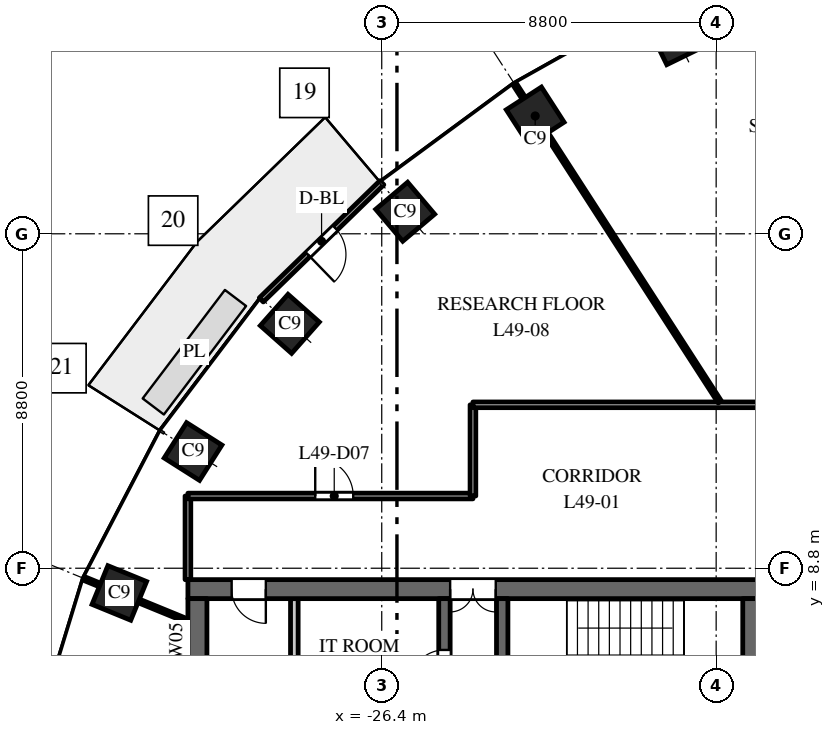
"""IFC4 building model, lengths in metres.
Left out: names, types, materials, properties, quantities, classifications, styles, units other than length and angle.
Written with IfcOpenShell. Run it as: python <this file> out.ifc"""

import sys

from ifc_helpers import new_model, si_unit, direction, frame, frame_2d, origin, origin_2d, place, context, subcontext, project, spatial, rectangle, extrude, element, fill, save


model = new_model("IFC4")
c1 = context("Model", 3, precision=1e-05, world=origin(), true_north=direction((0.0, 1.0)))
c2 = subcontext(c1, "Body", "Model", "MODEL_VIEW")
j1 = project(units=[si_unit("LENGTHUNIT", "METRE"), si_unit("PLANEANGLEUNIT", "RADIAN")], contexts=[c1])
p1 = place(None, origin())
s1 = spatial("IfcSite", under=j1, at=p1, CompositionType="ELEMENT")
p2 = place(p1, origin())
s2 = spatial("IfcBuilding", under=s1, at=p2, CompositionType="ELEMENT")
p3 = place(p2, frame((0.0, 0.0, 237.5)))
s3 = spatial("IfcBuildingStorey", under=s2, at=p3, CompositionType="ELEMENT", Elevation=237.5)
for number, where, z_axis, x_axis in (
    (1, (-18.646, 22.785, 0.0), (0.0, 0.0, 1.0), (-0.898, -0.439, 0.0)),
    (2, (-22.362, 20.7, 0.0), (0.0, 0.0, 1.0), (-0.84, -0.542, 0.0)),
    (3, (-25.783, 18.18, 0.0), (0.0, 0.0, 1.0), (-0.763, -0.646, 0.0)),
    (4, (-28.819, 15.23, 0.0), (0.0, 0.0, 1.0), (-0.663, -0.749, 0.0)),
    (5, (-31.365, 11.871, 0.0), (0.0, 0.0, 1.0), (-0.535, -0.845, 0.0)),
    (6, (-33.305, 8.149, 0.0), (0.0, 0.0, 1.0), (-0.379, -0.925, 0.0)),
):
    element("IfcColumn", number, at=place(p3, frame(where, z_axis=z_axis, x_axis=x_axis)), inside=s3, PredefinedType="COLUMN", context=c2, shape_type="SweptSolid", body=[
        extrude(rectangle(XDim=1.1, YDim=1.1, at=origin_2d()), origin(), (0.0, 0.0, 1.0), 4.0),
    ])
p4 = place(p3, frame((-16.5, 8.25, 0.0), z_axis=(0.0, 0.0, 1.0), x_axis=(-1.0, 0.0, 0.0)))
e7 = element("IfcWall", 7, at=p4, inside=s3, PredefinedType="SHEAR", context=c2, shape_type="SweptSolid", body=[
    extrude(rectangle(XDim=15.0, YDim=0.5, at=frame_2d((7.5, 0.0))), origin(), (0.0, 0.0, 1.0), 3.7),
])
p5 = place(p4, frame((6.9, 0.0, 0.0)))
e8 = element("IfcOpeningElement", 8, at=p5, cuts=e7, PredefinedType="OPENING", context=c2, shape_type="SweptSolid", body=[
    extrude(rectangle(XDim=1.2, YDim=2.1, at=frame_2d((0.6, 1.05))), frame((0.0, 0.26, 0.0), z_axis=(0.0, -1.0, 0.0), x_axis=(1.0, 0.0, 0.0)), (0.0, 0.0, 1.0), 0.52),
])
p6 = place(p4, frame((12.95, 0.0, 0.0)))
e9 = element("IfcOpeningElement", 9, at=p6, cuts=e7, PredefinedType="OPENING", context=c2, shape_type="SweptSolid", body=[
    extrude(rectangle(XDim=0.9, YDim=2.1, at=frame_2d((0.45, 1.05))), frame((0.0, 0.26, 0.0), z_axis=(0.0, -1.0, 0.0), x_axis=(1.0, 0.0, 0.0)), (0.0, 0.0, 1.0), 0.52),
])
p7 = place(p3, frame((-24.75, -8.0, 0.0), z_axis=(0.0, 0.0, 1.0), x_axis=(0.0, 1.0, 0.0)))
e10 = element("IfcWall", 10, at=p7, inside=s3, PredefinedType="SHEAR", context=c2, shape_type="SweptSolid", body=[
    extrude(rectangle(XDim=16.0, YDim=0.3, at=frame_2d((8.0, 0.0))), origin(), (0.0, 0.0, 1.0), 3.7),
])
p8 = place(p7, frame((4.425, 0.0, 0.0)))
e11 = element("IfcOpeningElement", 11, at=p8, cuts=e10, PredefinedType="OPENING", context=c2, shape_type="SweptSolid", body=[
    extrude(rectangle(XDim=1.1, YDim=2.1, at=frame_2d((0.55, 1.05))), frame((0.0, 0.16, 0.0), z_axis=(0.0, -1.0, 0.0), x_axis=(1.0, 0.0, 0.0)), (0.0, 0.0, 1.0), 0.32),
])
p9 = place(p7, frame((7.45, 0.0, 0.0)))
e12 = element("IfcOpeningElement", 12, at=p9, cuts=e10, PredefinedType="OPENING", context=c2, shape_type="SweptSolid", body=[
    extrude(rectangle(XDim=1.1, YDim=2.1, at=frame_2d((0.55, 1.05))), frame((0.0, 0.16, 0.0), z_axis=(0.0, -1.0, 0.0), x_axis=(1.0, 0.0, 0.0)), (0.0, 0.0, 1.0), 0.32),
])
p10 = place(p7, frame((10.475, 0.0, 0.0)))
e13 = element("IfcOpeningElement", 13, at=p10, cuts=e10, PredefinedType="OPENING", context=c2, shape_type="SweptSolid", body=[
    extrude(rectangle(XDim=1.1, YDim=2.1, at=frame_2d((0.55, 1.05))), frame((0.0, 0.16, 0.0), z_axis=(0.0, -1.0, 0.0), x_axis=(1.0, 0.0, 0.0)), (0.0, 0.0, 1.0), 0.32),
])
p11 = place(p7, frame((13.75, 0.0, 0.0)))
e14 = element("IfcOpeningElement", 14, at=p11, cuts=e10, PredefinedType="OPENING", context=c2, shape_type="SweptSolid", body=[
    extrude(rectangle(XDim=0.9, YDim=2.1, at=frame_2d((0.45, 1.05))), frame((0.0, 0.16, 0.0), z_axis=(0.0, -1.0, 0.0), x_axis=(1.0, 0.0, 0.0)), (0.0, 0.0, 1.0), 0.32),
])
p12 = place(p7, frame((1.35, 0.0, 0.0)))
e15 = element("IfcOpeningElement", 15, at=p12, cuts=e10, PredefinedType="OPENING", context=c2, shape_type="SweptSolid", body=[
    extrude(rectangle(XDim=0.9, YDim=2.1, at=frame_2d((0.45, 1.05))), frame((0.0, 0.16, 0.0), z_axis=(0.0, -1.0, 0.0), x_axis=(1.0, 0.0, 0.0)), (0.0, 0.0, 1.0), 0.32),
])
p13 = place(p3, frame((-16.7, -8.0, 0.0), z_axis=(0.0, 0.0, 1.0), x_axis=(0.0, 1.0, 0.0)))
e16 = element("IfcWall", 16, at=p13, inside=s3, PredefinedType="SHEAR", context=c2, shape_type="SweptSolid", body=[
    extrude(rectangle(XDim=16.0, YDim=0.4, at=frame_2d((8.0, 0.0))), origin(), (0.0, 0.0, 1.0), 3.7),
])
p14 = place(p3, frame((-31.25, -8.0, 0.0), z_axis=(0.0, 0.0, 1.0), x_axis=(0.0, 1.0, 0.0)))
e17 = element("IfcWall", 17, at=p14, inside=s3, PredefinedType="SHEAR", context=c2, shape_type="SweptSolid", body=[
    extrude(rectangle(XDim=16.0, YDim=0.5, at=frame_2d((8.0, 0.0))), origin(), (0.0, 0.0, 1.0), 3.7),
])
p15 = place(p3, frame((-28.7, 4.75, 0.0), z_axis=(0.0, 0.0, 1.0), x_axis=(0.0, 1.0, 0.0)))
e18 = element("IfcWall", 18, at=p15, inside=s3, PredefinedType="PARTITIONING", context=c2, shape_type="SweptSolid", body=[
    extrude(rectangle(XDim=3.25, YDim=0.2, at=frame_2d((1.625, 0.0))), origin(), (0.0, 0.0, 1.0), 3.7),
])
p16 = place(p3, frame((-23.23, 2.25, 0.0), z_axis=(0.0, 0.0, 1.0), x_axis=(0.0, 1.0, 0.0)))
e19 = element("IfcWall", 19, at=p16, inside=s3, PredefinedType="SHEAR", context=c2, shape_type="SweptSolid", body=[
    extrude(rectangle(XDim=5.75, YDim=0.3, at=frame_2d((2.875, 0.0))), origin(), (0.0, 0.0, 1.0), 3.7),
])
p17 = place(p16, frame((0.6, 0.0, 0.0)))
e20 = element("IfcOpeningElement", 20, at=p17, cuts=e19, PredefinedType="OPENING", context=c2, shape_type="SweptSolid", body=[
    extrude(rectangle(XDim=1.0, YDim=2.1, at=frame_2d((0.5, 1.05))), frame((0.0, 0.16, 0.0), z_axis=(0.0, -1.0, 0.0), x_axis=(1.0, 0.0, 0.0)), (0.0, 0.0, 1.0), 0.32),
])
p18 = place(p3, frame((-26.396, 18.943, 0.0), z_axis=(0.0, 0.0, 1.0), x_axis=(-0.717214761864, -0.696852197647, 0.0)))
e21 = element("IfcWall", 21, at=p18, inside=s3, PredefinedType="STANDARD", context=c2, shape_type="SweptSolid", body=[
    extrude(rectangle(XDim=4.424, YDim=0.15, at=frame_2d((2.212, 0.0))), origin(), (0.0, 0.0, 1.0), 3.7),
])
p19 = place(p18, frame((1.712, 0.0, 0.0)))
e22 = element("IfcOpeningElement", 22, at=p19, cuts=e21, PredefinedType="OPENING", context=c2, shape_type="SweptSolid", body=[
    extrude(rectangle(XDim=1.0, YDim=2.4, at=frame_2d((0.5, 1.2))), frame((0.0, 0.085, 0.0), z_axis=(0.0, -1.0, 0.0), x_axis=(1.0, 0.0, 0.0)), (0.0, 0.0, 1.0), 0.17),
])
p20 = place(p3, frame((-34.234, 8.53, 0.0), z_axis=(0.0, 0.0, 1.0), x_axis=(0.925344112436, -0.379128307542, 0.0)))
e23 = element("IfcWall", 23, at=p20, inside=s3, PredefinedType="PARTITIONING", context=c2, shape_type="SweptSolid", body=[
    extrude(rectangle(XDim=2.954, YDim=0.1, at=frame_2d((1.477, 0.0))), origin(), (0.0, 0.0, 1.0), 3.0),
])
p21 = place(p3, frame((-31.5, 8.5, 0.0), z_axis=(0.0, 0.0, 1.0), x_axis=(0.0, 1.0, 0.0)))
e24 = element("IfcWall", 24, at=p21, inside=s3, PredefinedType="PARTITIONING", context=c2, shape_type="SweptSolid", body=[
    extrude(rectangle(XDim=2.2, YDim=0.15, at=frame_2d((1.1, 0.0))), origin(), (0.0, 0.0, 1.0), 3.7),
])
p22 = place(p3, frame((-31.5, 10.7, 0.0), z_axis=(0.0, 0.0, 1.0), x_axis=(1.0, 0.0, 0.0)))
e25 = element("IfcWall", 25, at=p22, inside=s3, PredefinedType="PARTITIONING", context=c2, shape_type="SweptSolid", body=[
    extrude(rectangle(XDim=7.5, YDim=0.15, at=frame_2d((3.75, 0.0))), origin(), (0.0, 0.0, 1.0), 3.1),
])
p23 = place(p22, frame((3.35, 0.0, 0.0)))
e26 = element("IfcOpeningElement", 26, at=p23, cuts=e25, PredefinedType="OPENING", context=c2, shape_type="SweptSolid", body=[
    extrude(rectangle(XDim=1.0, YDim=2.1, at=frame_2d((0.5, 1.05))), frame((0.0, 0.085, 0.0), z_axis=(0.0, -1.0, 0.0), x_axis=(1.0, 0.0, 0.0)), (0.0, 0.0, 1.0), 0.17),
])
p24 = place(p3, frame((-24.0, 10.7, 0.0), z_axis=(0.0, 0.0, 1.0), x_axis=(0.0, 1.0, 0.0)))
e27 = element("IfcWall", 27, at=p24, inside=s3, PredefinedType="PARTITIONING", context=c2, shape_type="SweptSolid", body=[
    extrude(rectangle(XDim=2.4, YDim=0.15, at=frame_2d((1.2, 0.0))), origin(), (0.0, 0.0, 1.0), 3.7),
])
p25 = place(p3, frame((-24.0, 13.1, 0.0), z_axis=(0.0, 0.0, 1.0), x_axis=(1.0, 0.0, 0.0)))
e28 = element("IfcWall", 28, at=p25, inside=s3, PredefinedType="PARTITIONING", context=c2, shape_type="SweptSolid", body=[
    extrude(rectangle(XDim=13.357, YDim=0.15, at=frame_2d((6.678, 0.0))), origin(), (0.0, 0.0, 1.0), 2.75),
])
p26 = place(p25, frame((9.457, 0.0, 0.0)))
e29 = element("IfcOpeningElement", 29, at=p26, cuts=e28, PredefinedType="OPENING", context=c2, shape_type="SweptSolid", body=[
    extrude(rectangle(XDim=1.0, YDim=2.1, at=frame_2d((0.5, 1.05))), frame((0.0, 0.085, 0.0), z_axis=(0.0, -1.0, 0.0), x_axis=(1.0, 0.0, 0.0)), (0.0, 0.0, 1.0), 0.17),
])
p27 = place(p3, frame((-22.905, 21.542, 0.0), z_axis=(0.0, 0.0, 1.0), x_axis=(0.542277075573, -0.840199722273, 0.0)))
e30 = element("IfcWall", 30, at=p27, inside=s3, PredefinedType="PARTITIONING", context=c2, shape_type="SweptSolid", body=[
    extrude(rectangle(XDim=9.958, YDim=0.1, at=frame_2d((4.979, 0.0))), origin(), (0.0, 0.0, 1.0), 3.0),
])
p28 = place(p5, origin())
e31 = element("IfcDoor", 31, at=p28, inside=s3, OperationType="DOUBLE_DOOR_DOUBLE_SWING", PredefinedType="DOOR", context=c2, shape_type="SweptSolid", body=[
    extrude(rectangle(XDim=1.2, YDim=2.1, at=frame_2d((0.6, 1.05))), frame((0.0, 0.025, 0.0), z_axis=(0.0, -1.0, 0.0), x_axis=(1.0, 0.0, 0.0)), (0.0, 0.0, 1.0), 0.05),
])
fill(e8, e31)
p29 = place(p11, origin())
e32 = element("IfcDoor", 32, at=p29, inside=s3, OperationType="SINGLE_SWING_RIGHT", PredefinedType="DOOR", context=c2, shape_type="SweptSolid", body=[
    extrude(rectangle(XDim=0.9, YDim=2.1, at=frame_2d((0.45, 1.05))), frame((0.0, 0.025, 0.0), z_axis=(0.0, -1.0, 0.0), x_axis=(1.0, 0.0, 0.0)), (0.0, 0.0, 1.0), 0.05),
])
fill(e14, e32)
p30 = place(p6, origin())
e33 = element("IfcDoor", 33, at=p30, inside=s3, OperationType="SINGLE_SWING_RIGHT", PredefinedType="DOOR", context=c2, shape_type="SweptSolid", body=[
    extrude(rectangle(XDim=0.9, YDim=2.1, at=frame_2d((0.45, 1.05))), frame((0.0, 0.025, 0.0), z_axis=(0.0, -1.0, 0.0), x_axis=(1.0, 0.0, 0.0)), (0.0, 0.0, 1.0), 0.05),
])
fill(e9, e33)
p31 = place(p19, origin())
e34 = element("IfcDoor", 34, at=p31, inside=s3, OperationType="SINGLE_SWING_RIGHT", PredefinedType="DOOR", context=c2, shape_type="SweptSolid", body=[
    extrude(rectangle(XDim=1.0, YDim=2.4, at=frame_2d((0.5, 1.2))), frame((0.0, 0.025, 0.0), z_axis=(0.0, -1.0, 0.0), x_axis=(1.0, 0.0, 0.0)), (0.0, 0.0, 1.0), 0.05),
])
fill(e22, e34)
p32 = place(p23, origin())
e35 = element("IfcDoor", 35, at=p32, inside=s3, OperationType="SINGLE_SWING_LEFT", PredefinedType="DOOR", context=c2, shape_type="SweptSolid", body=[
    extrude(rectangle(XDim=1.0, YDim=2.1, at=frame_2d((0.5, 1.05))), frame((0.0, 0.025, 0.0), z_axis=(0.0, -1.0, 0.0), x_axis=(1.0, 0.0, 0.0)), (0.0, 0.0, 1.0), 0.05),
])
fill(e26, e35)
save(model, sys.argv[1])
